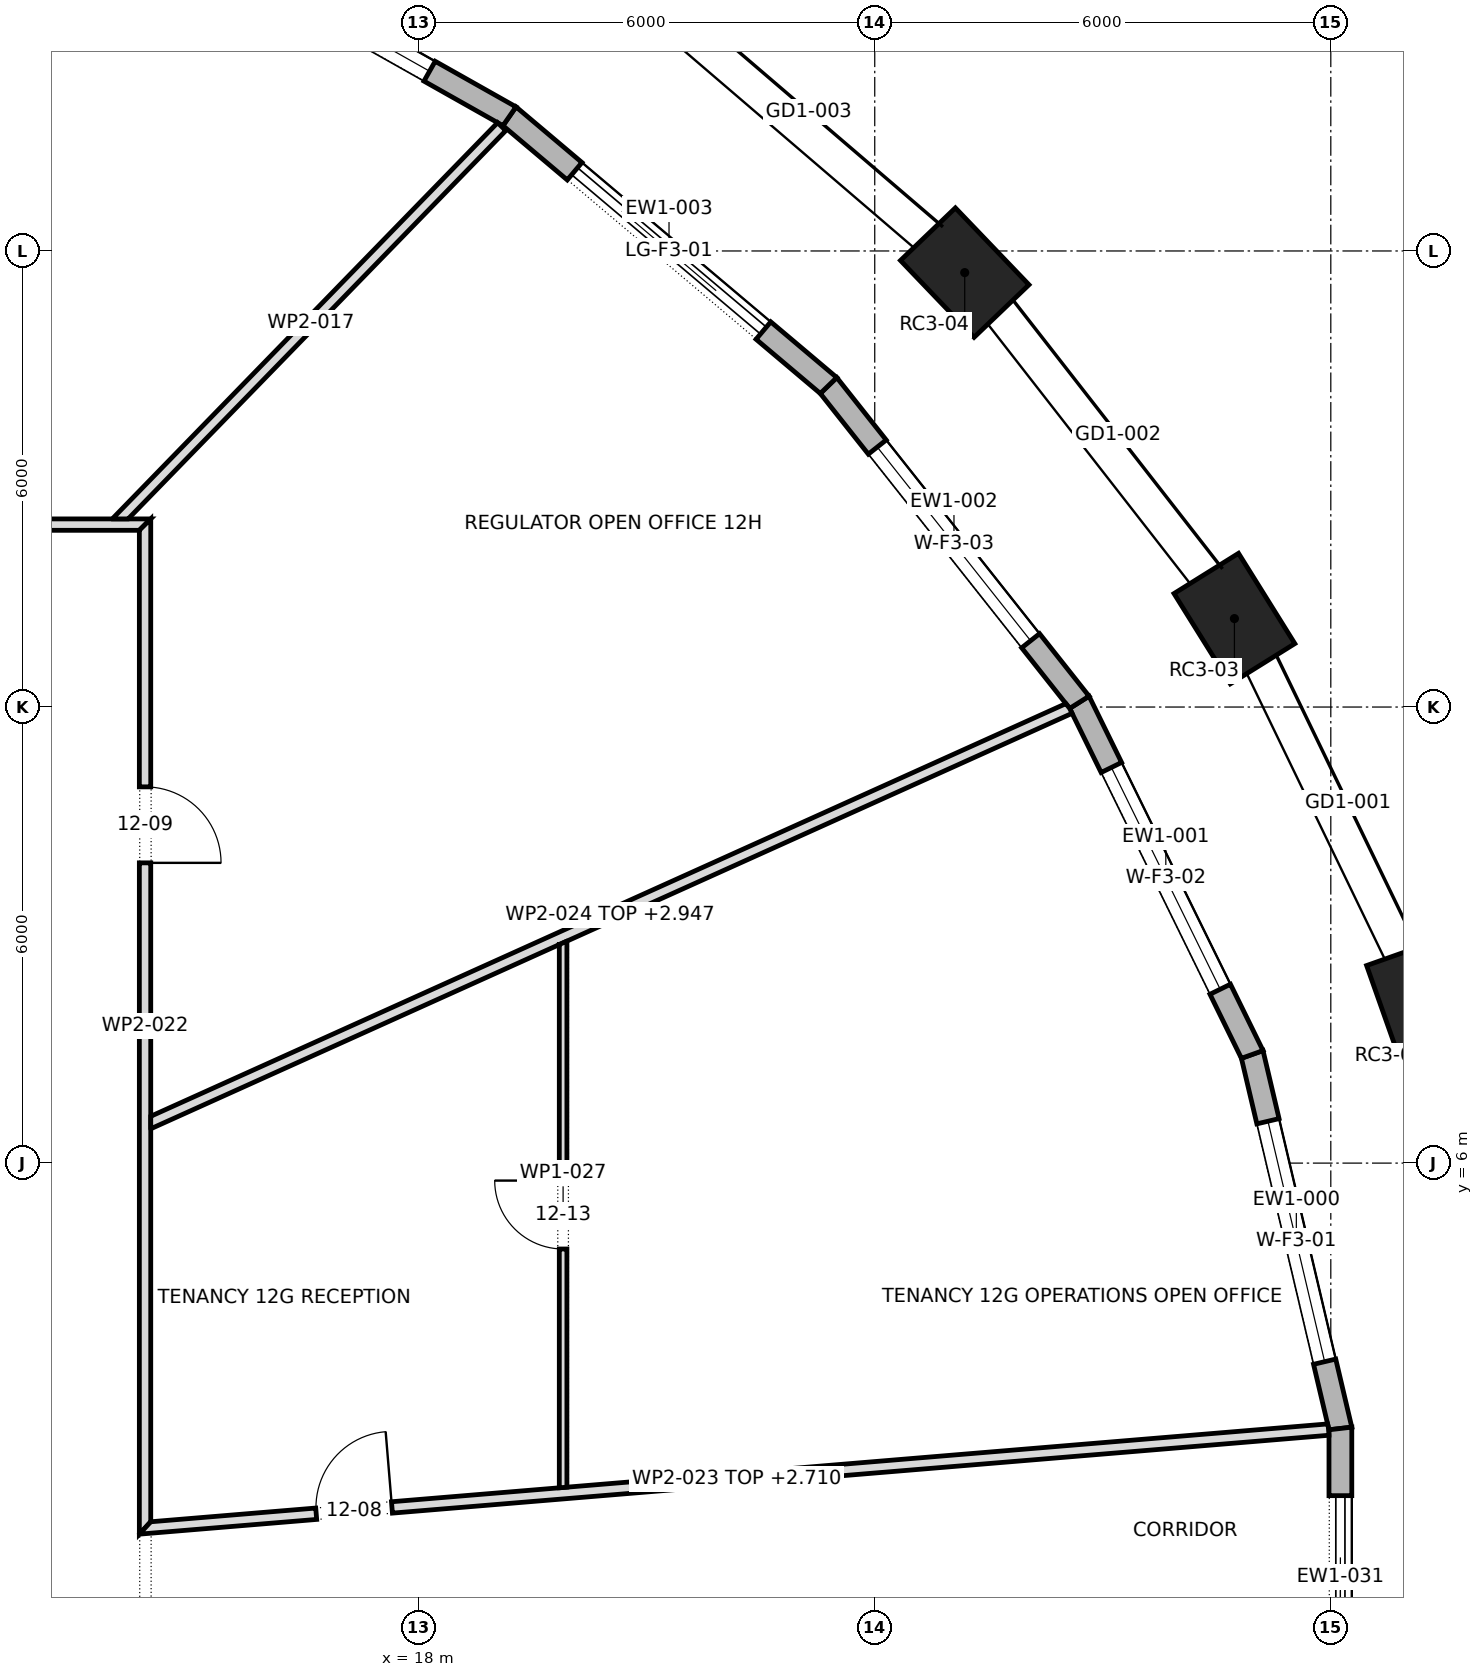
"""IFC4 building model, lengths in metres.
Left out: names, types, materials, properties, quantities, classifications, styles, units other than length and angle.
Written with IfcOpenShell. Run it as: python <this file> out.ifc"""

import sys

from ifc_helpers import new_model, si_unit, direction, frame, frame_2d, origin, origin_2d, place, context, subcontext, project, spatial, polyline, rectangle, outline, extrude, element, fill, save


model = new_model("IFC4")
c1 = context("Model", 3, precision=1e-05, world=origin(), true_north=direction((0.0, 1.0)))
c2 = subcontext(c1, "Body", "Model", "MODEL_VIEW")
j1 = project(units=[si_unit("LENGTHUNIT", "METRE"), si_unit("PLANEANGLEUNIT", "RADIAN")], contexts=[c1])
p1 = place(None, origin())
s1 = spatial("IfcSite", under=j1, at=p1, CompositionType="ELEMENT")
p2 = place(p1, origin())
s2 = spatial("IfcBuilding", under=s1, at=p2, CompositionType="ELEMENT")
p3 = place(p2, frame((0.0, 0.0, 186.9)))
s3 = spatial("IfcBuildingStorey", under=s2, at=p3, CompositionType="ELEMENT", Elevation=186.9)
for number, where, z_axis, x_axis in (
    (1, (31.176, 8.106, 0.0), (0.0, 0.0, 1.0), (-0.334, 0.943, 0.0)),
    (2, (28.732, 13.164, 0.0), (0.0, 0.0, 1.0), (-0.529, 0.849, 0.0)),
    (3, (25.184, 17.715, 0.0), (0.0, 0.0, 1.0), (-0.692, 0.722, 0.0)),
):
    element("IfcColumn", number, at=place(p3, frame(where, z_axis=z_axis, x_axis=x_axis)), inside=s3, PredefinedType="COLUMN", context=c2, shape_type="SweptSolid", body=[
        extrude(rectangle(XDim=1.4, YDim=1.0, at=origin_2d()), origin(), (0.0, 0.0, 1.0), 4.0),
    ])
p4 = place(p3, frame((30.126, 2.509, 0.0), z_axis=(0.0, 0.0, 1.0), x_axis=(-0.229434992017, 0.973323987395, 0.0)))
e4 = element("IfcWall", 4, at=p4, inside=s3, PredefinedType="STANDARD", context=c2, shape_type="SweptSolid", body=[
    extrude(outline(polyline([(-0.017, -0.15), (5.072, -0.15), (5.039, 0.15), (0.017, 0.15), (-0.017, -0.15)])), origin(), (0.0, 0.0, 1.0), 3.7),
])
p5 = place(p4, frame((0.903, 0.0, 0.6)))
e5 = element("IfcOpeningElement", 5, at=p5, cuts=e4, PredefinedType="OPENING", context=c2, shape_type="SweptSolid", body=[
    extrude(rectangle(XDim=3.25, YDim=2.65, at=frame_2d((1.625, 1.325))), frame((0.0, 0.162, 0.0), z_axis=(0.0, -1.0, 0.0), x_axis=(1.0, 0.0, 0.0)), (0.0, 0.0, 1.0), 0.324),
])
p6 = place(p3, frame((28.966, 7.429, 0.0), z_axis=(0.0, 0.0, 1.0), x_axis=(-0.440673883676, 0.897667270343, 0.0)))
e6 = element("IfcWall", 6, at=p6, inside=s3, PredefinedType="STANDARD", context=c2, shape_type="SweptSolid", body=[
    extrude(outline(polyline([(-0.017, -0.15), (5.177, -0.15), (5.145, 0.15), (0.017, 0.15), (-0.017, -0.15)])), origin(), (0.0, 0.0, 1.0), 3.7),
])
p7 = place(p6, frame((0.956, 0.0, 0.6)))
e7 = element("IfcOpeningElement", 7, at=p7, cuts=e6, PredefinedType="OPENING", context=c2, shape_type="SweptSolid", body=[
    extrude(rectangle(XDim=3.25, YDim=2.65, at=frame_2d((1.625, 1.325))), frame((0.0, 0.162, 0.0), z_axis=(0.0, -1.0, 0.0), x_axis=(1.0, 0.0, 0.0)), (0.0, 0.0, 1.0), 0.324),
])
p8 = place(p3, frame((26.692, 12.062, 0.0), z_axis=(0.0, 0.0, 1.0), x_axis=(-0.620766467446, 0.78399553117, 0.0)))
e8 = element("IfcWall", 8, at=p8, inside=s3, PredefinedType="STANDARD", context=c2, shape_type="SweptSolid", body=[
    extrude(outline(polyline([(-0.016, -0.15), (5.331, -0.15), (5.301, 0.15), (0.016, 0.15), (-0.016, -0.15)])), origin(), (0.0, 0.0, 1.0), 3.7),
])
p9 = place(p8, frame((1.033, 0.0, 0.6)))
e9 = element("IfcOpeningElement", 9, at=p9, cuts=e8, PredefinedType="OPENING", context=c2, shape_type="SweptSolid", body=[
    extrude(rectangle(XDim=3.25, YDim=2.65, at=frame_2d((1.625, 1.325))), frame((0.0, 0.162, 0.0), z_axis=(0.0, -1.0, 0.0), x_axis=(1.0, 0.0, 0.0)), (0.0, 0.0, 1.0), 0.324),
])
p10 = place(p3, frame((23.392, 16.23, 0.0), z_axis=(0.0, 0.0, 1.0), x_axis=(-0.764238764041, 0.64493341636, 0.0)))
e10 = element("IfcWall", 10, at=p10, inside=s3, PredefinedType="STANDARD", context=c2, shape_type="SweptSolid", body=[
    extrude(outline(polyline([(-0.015, -0.15), (5.507, -0.15), (5.478, 0.15), (0.015, 0.15), (-0.015, -0.15)])), origin(), (0.0, 0.0, 1.0), 3.7),
])
p11 = place(p10, frame((1.121, 0.0, 0.0)))
e11 = element("IfcOpeningElement", 11, at=p11, cuts=e10, PredefinedType="OPENING", context=c2, shape_type="SweptSolid", body=[
    extrude(rectangle(XDim=3.25, YDim=3.25, at=frame_2d((1.625, 1.625))), frame((0.0, 0.162, 0.0), z_axis=(0.0, -1.0, 0.0), x_axis=(1.0, 0.0, 0.0)), (0.0, 0.0, 1.0), 0.324),
])
p12 = place(p3, frame((19.195, 19.772, 0.0), z_axis=(0.0, 0.0, 1.0), x_axis=(-0.871077775545, 0.491145099691, 0.0)))
e12 = element("IfcWall", 12, at=p12, inside=s3, PredefinedType="STANDARD", context=c2, shape_type="SweptSolid", body=[
    extrude(outline(polyline([(-0.014, -0.15), (5.677, -0.15), (5.65, 0.15), (0.014, 0.15), (-0.014, -0.15)])), origin(), (0.0, 0.0, 1.0), 3.7),
])
p13 = place(p12, frame((1.207, 0.0, 0.6)))
e13 = element("IfcOpeningElement", 13, at=p13, cuts=e12, PredefinedType="OPENING", context=c2, shape_type="SweptSolid", body=[
    extrude(rectangle(XDim=3.25, YDim=2.65, at=frame_2d((1.625, 1.325))), frame((0.0, 0.162, 0.0), z_axis=(0.0, -1.0, 0.0), x_axis=(1.0, 0.0, 0.0)), (0.0, 0.0, 1.0), 0.324),
])
p14 = place(p3, frame((30.126, -2.509, 0.0), z_axis=(0.0, 0.0, 1.0), x_axis=(0.0, 1.0, 0.0)))
e14 = element("IfcWall", 14, at=p14, inside=s3, PredefinedType="STANDARD", context=c2, shape_type="SweptSolid", body=[
    extrude(outline(polyline([(-0.017, -0.15), (5.035, -0.15), (5.0, 0.15), (0.017, 0.15), (-0.017, -0.15)])), origin(), (0.0, 0.0, 1.0), 3.7),
])
p15 = place(p14, frame((0.884, 0.0, 0.0)))
e15 = element("IfcOpeningElement", 15, at=p15, cuts=e14, PredefinedType="OPENING", context=c2, shape_type="SweptSolid", body=[
    extrude(rectangle(XDim=3.25, YDim=3.25, at=frame_2d((1.625, 1.625))), frame((0.0, 0.162, 0.0), z_axis=(0.0, -1.0, 0.0), x_axis=(1.0, 0.0, 0.0)), (0.0, 0.0, 1.0), 0.324),
])
p16 = place(p3, frame((1.596, 14.4, 0.0), z_axis=(0.0, 0.0, 1.0), x_axis=(1.0, 0.0, 0.0)))
e16 = element("IfcWall", 16, at=p16, inside=s3, PredefinedType="PARTITIONING", context=c2, shape_type="SweptSolid", body=[
    extrude(outline(polyline([(0.0, -0.075), (1.818, -0.075), (3.637, -0.075), (5.455, -0.075), (7.274, -0.075), (9.092, -0.075), (10.911, -0.075), (12.729, -0.075), (12.879, 0.075), (11.063, 0.075), (9.248, 0.075), (7.432, 0.075), (5.616, 0.075), (3.8, 0.075), (1.984, 0.075), (0.168, 0.075), (0.0, -0.075), (0.0, -0.075)])), origin(), (0.0, 0.0, 1.0), 3.7),
])
p17 = place(p16, frame((5.744, 0.0, 0.0)))
e17 = element("IfcOpeningElement", 17, at=p17, cuts=e16, PredefinedType="OPENING", context=c2, shape_type="SweptSolid", body=[
    extrude(rectangle(XDim=1.0, YDim=2.1, at=frame_2d((0.5, 1.05))), frame((0.0, 0.087, 0.0), z_axis=(0.0, -1.0, 0.0), x_axis=(1.0, 0.0, 0.0)), (0.0, 0.0, 1.0), 0.174),
])
p18 = place(p3, frame((14.022, 14.423, 0.0), z_axis=(0.0, 0.0, 1.0), x_axis=(0.69721790069, 0.716859260216, 0.0)))
e18 = element("IfcWall", 18, at=p18, inside=s3, PredefinedType="PARTITIONING", context=c2, shape_type="SweptSolid", body=[
    extrude(outline(polyline([(0.0, 0.075), (0.0, 0.075), (0.146, -0.075), (1.927, -0.075), (3.708, -0.075), (5.49, -0.075), (7.271, -0.075), (7.271, 0.075), (5.454, 0.075), (3.636, 0.075), (1.818, 0.075), (0.0, 0.075)])), origin(), (0.0, 0.0, 1.0), 3.7),
])
p19 = place(p3, frame((14.4, 1.118, 0.0), z_axis=(0.0, 0.0, 1.0), x_axis=(0.0, 1.0, 0.0)))
e19 = element("IfcWall", 19, at=p19, inside=s3, PredefinedType="PARTITIONING", context=c2, shape_type="SweptSolid", body=[
    extrude(outline(polyline([(0.163, -0.075), (2.048, -0.075), (3.933, -0.075), (5.817, -0.075), (7.702, -0.075), (9.587, -0.075), (11.472, -0.075), (13.356, -0.075), (13.207, 0.075), (11.32, 0.075), (9.433, 0.075), (7.547, 0.075), (5.66, 0.075), (3.773, 0.075), (1.887, 0.075), (0.0, 0.075), (0.163, -0.075)])), origin(), (0.0, 0.0, 1.0), 3.7),
])
p20 = place(p19, frame((8.832, 0.0, 0.0)))
e20 = element("IfcOpeningElement", 20, at=p20, cuts=e19, PredefinedType="OPENING", context=c2, shape_type="SweptSolid", body=[
    extrude(rectangle(XDim=1.0, YDim=2.1, at=frame_2d((0.5, 1.05))), frame((0.0, 0.087, 0.0), z_axis=(0.0, -1.0, 0.0), x_axis=(1.0, 0.0, 0.0)), (0.0, 0.0, 1.0), 0.174),
])
p21 = place(p3, frame((14.319, 1.193, 0.0), z_axis=(0.0, 0.0, 1.0), x_axis=(0.996561500002, 0.082856361942, 0.0)))
e21 = element("IfcWall", 21, at=p21, inside=s3, PredefinedType="PARTITIONING", context=c2, shape_type="SweptSolid", body=[
    extrude(outline(polyline([(0.0, -0.075), (1.963, -0.075), (3.926, -0.075), (5.889, -0.075), (7.853, -0.075), (9.816, -0.075), (11.779, -0.075), (13.742, -0.075), (15.705, -0.075), (15.705, -0.074), (15.705, 0.036), (15.699, 0.075), (13.757, 0.075), (11.815, 0.075), (9.873, 0.075), (7.931, 0.075), (5.989, 0.075), (4.047, 0.075), (2.105, 0.075), (0.163, 0.075), (0.082, 0.0), (0.0, -0.075), (0.0, -0.075)])), origin(), (0.0, 0.0, 1.0), 2.71),
])
p22 = place(p21, frame((2.341, 0.0, 0.0)))
e22 = element("IfcOpeningElement", 22, at=p22, cuts=e21, PredefinedType="OPENING", context=c2, shape_type="SweptSolid", body=[
    extrude(rectangle(XDim=1.0, YDim=2.1, at=frame_2d((0.5, 1.05))), frame((0.0, 0.087, 0.0), z_axis=(0.0, -1.0, 0.0), x_axis=(1.0, 0.0, 0.0)), (0.0, 0.0, 1.0), 0.174),
])
p23 = place(p3, frame((14.445, 6.52, 0.0), z_axis=(0.0, 0.0, 1.0), x_axis=(0.911609963385, 0.411056291349, 0.0)))
e23 = element("IfcWall", 23, at=p23, inside=s3, PredefinedType="PARTITIONING", context=c2, shape_type="SweptSolid", body=[
    extrude(outline(polyline([(0.0, -0.075), (1.965, -0.075), (3.93, -0.075), (5.896, -0.075), (5.897, -0.073), (5.901, -0.075), (7.75, -0.075), (9.599, -0.075), (11.447, -0.075), (13.296, -0.075), (13.296, -0.069), (13.294, -0.003), (13.274, 0.075), (11.387, 0.075), (9.501, 0.075), (7.614, 0.075), (5.727, 0.075), (3.841, 0.075), (1.954, 0.075), (0.067, 0.075), (0.0, -0.074), (0.0, -0.075)])), origin(), (0.0, 0.0, 1.0), 2.947),
])
p24 = place(p3, frame((19.9, 8.92, 0.0), z_axis=(0.0, 0.0, 1.0), x_axis=(0.0, -1.0, 0.0)))
e24 = element("IfcWall", 24, at=p24, inside=s3, PredefinedType="PARTITIONING", context=c2, shape_type="SweptSolid", body=[
    extrude(outline(polyline([(7.191, -0.05), (7.191, -0.048), (7.183, 0.05), (5.387, 0.05), (3.592, 0.05), (1.796, 0.05), (0.0, 0.05), (0.0, 0.049), (0.045, -0.05), (1.832, -0.05), (3.618, -0.05), (5.405, -0.05), (7.191, -0.05)])), origin(), (0.0, 0.0, 1.0), 3.7),
])
p25 = place(p24, frame((3.15, 0.0, 0.0)))
e25 = element("IfcOpeningElement", 25, at=p25, cuts=e24, PredefinedType="OPENING", context=c2, shape_type="SweptSolid", body=[
    extrude(rectangle(XDim=0.9, YDim=2.1, at=frame_2d((0.45, 1.05))), frame((0.0, 0.062, 0.0), z_axis=(0.0, -1.0, 0.0), x_axis=(1.0, 0.0, 0.0)), (0.0, 0.0, 1.0), 0.124),
])
p26 = place(p5, origin())
e26 = element("IfcWindow", 26, at=p26, inside=s3, PartitioningType="TRIPLE_PANEL_VERTICAL", PredefinedType="WINDOW", context=c2, shape_type="SweptSolid", body=[
    extrude(rectangle(XDim=3.25, YDim=2.65, at=frame_2d((1.625, 1.325))), frame((0.0, 0.03, 0.0), z_axis=(0.0, -1.0, 0.0), x_axis=(1.0, 0.0, 0.0)), (0.0, 0.0, 1.0), 0.06),
])
fill(e5, e26)
p27 = place(p7, origin())
e27 = element("IfcWindow", 27, at=p27, inside=s3, PartitioningType="TRIPLE_PANEL_VERTICAL", PredefinedType="WINDOW", context=c2, shape_type="SweptSolid", body=[
    extrude(rectangle(XDim=3.25, YDim=2.65, at=frame_2d((1.625, 1.325))), frame((0.0, 0.03, 0.0), z_axis=(0.0, -1.0, 0.0), x_axis=(1.0, 0.0, 0.0)), (0.0, 0.0, 1.0), 0.06),
])
fill(e7, e27)
p28 = place(p9, origin())
e28 = element("IfcWindow", 28, at=p28, inside=s3, PartitioningType="TRIPLE_PANEL_VERTICAL", PredefinedType="WINDOW", context=c2, shape_type="SweptSolid", body=[
    extrude(rectangle(XDim=3.25, YDim=2.65, at=frame_2d((1.625, 1.325))), frame((0.0, 0.03, 0.0), z_axis=(0.0, -1.0, 0.0), x_axis=(1.0, 0.0, 0.0)), (0.0, 0.0, 1.0), 0.06),
])
fill(e9, e28)
p29 = place(p11, origin())
e29 = element("IfcDoor", 29, at=p29, inside=s3, OperationType="DOUBLE_DOOR_SLIDING", PredefinedType="DOOR", context=c2, shape_type="SweptSolid", body=[
    extrude(rectangle(XDim=3.25, YDim=3.25, at=frame_2d((1.625, 1.625))), frame((0.0, 0.025, 0.0), z_axis=(0.0, -1.0, 0.0), x_axis=(1.0, 0.0, 0.0)), (0.0, 0.0, 1.0), 0.05),
])
fill(e11, e29)
p30 = place(p13, origin())
e30 = element("IfcWindow", 30, at=p30, inside=s3, PartitioningType="TRIPLE_PANEL_VERTICAL", PredefinedType="WINDOW", context=c2, shape_type="SweptSolid", body=[
    extrude(rectangle(XDim=3.25, YDim=2.65, at=frame_2d((1.625, 1.325))), frame((0.0, 0.03, 0.0), z_axis=(0.0, -1.0, 0.0), x_axis=(1.0, 0.0, 0.0)), (0.0, 0.0, 1.0), 0.06),
])
fill(e13, e30)
p31 = place(p15, origin())
e31 = element("IfcDoor", 31, at=p31, inside=s3, OperationType="DOUBLE_DOOR_SLIDING", PredefinedType="DOOR", context=c2, shape_type="SweptSolid", body=[
    extrude(rectangle(XDim=3.25, YDim=3.25, at=frame_2d((1.625, 1.625))), frame((0.0, 0.025, 0.0), z_axis=(0.0, -1.0, 0.0), x_axis=(1.0, 0.0, 0.0)), (0.0, 0.0, 1.0), 0.05),
])
fill(e15, e31)
p32 = place(p22, origin())
e32 = element("IfcDoor", 32, at=p32, inside=s3, OperationType="SINGLE_SWING_LEFT", PredefinedType="DOOR", context=c2, shape_type="SweptSolid", body=[
    extrude(rectangle(XDim=1.0, YDim=2.1, at=frame_2d((0.5, 1.05))), frame((0.0, 0.025, 0.0), z_axis=(0.0, -1.0, 0.0), x_axis=(1.0, 0.0, 0.0)), (0.0, 0.0, 1.0), 0.05),
])
fill(e22, e32)
p33 = place(p20, frame((1.0, 0.0, 0.0), z_axis=(0.0, 0.0, 1.0), x_axis=(-1.0, 0.0, 0.0)))
e33 = element("IfcDoor", 33, at=p33, inside=s3, OperationType="SINGLE_SWING_LEFT", PredefinedType="DOOR", context=c2, shape_type="SweptSolid", body=[
    extrude(rectangle(XDim=1.0, YDim=2.1, at=frame_2d((0.5, 1.05))), frame((0.0, 0.025, 0.0), z_axis=(0.0, -1.0, 0.0), x_axis=(1.0, 0.0, 0.0)), (0.0, 0.0, 1.0), 0.05),
])
fill(e20, e33)
p34 = place(p25, frame((0.9, 0.0, 0.0), z_axis=(0.0, 0.0, 1.0), x_axis=(-1.0, 0.0, 0.0)))
e34 = element("IfcDoor", 34, at=p34, inside=s3, OperationType="SINGLE_SWING_LEFT", PredefinedType="DOOR", context=c2, shape_type="SweptSolid", body=[
    extrude(rectangle(XDim=0.9, YDim=2.1, at=frame_2d((0.45, 1.05))), frame((0.0, 0.025, 0.0), z_axis=(0.0, -1.0, 0.0), x_axis=(1.0, 0.0, 0.0)), (0.0, 0.0, 1.0), 0.05),
])
fill(e25, e34)
save(model, sys.argv[1])
